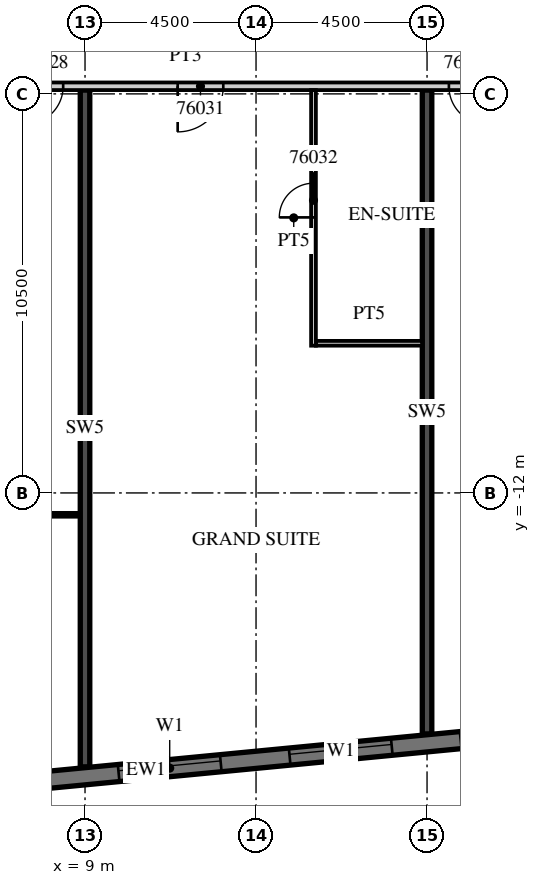
"""IFC4 building model, lengths in metres.
Left out: names, types, materials, properties, quantities, classifications, styles, units other than length and angle.
Written with IfcOpenShell. Run it as: python <this file> out.ifc"""

import sys

from ifc_helpers import new_model, si_unit, direction, frame, frame_2d, origin, place, context, subcontext, project, spatial, rectangle, extrude, element, fill, save


model = new_model("IFC4")
c1 = context("Model", 3, precision=1e-05, world=origin(), true_north=direction((0.0, 1.0)))
c2 = subcontext(c1, "Body", "Model", "MODEL_VIEW")
j1 = project(units=[si_unit("LENGTHUNIT", "METRE"), si_unit("PLANEANGLEUNIT", "RADIAN")], contexts=[c1])
p1 = place(None, origin())
s1 = spatial("IfcSite", under=j1, at=p1, CompositionType="ELEMENT")
p2 = place(p1, origin())
s2 = spatial("IfcBuilding", under=s1, at=p2, CompositionType="ELEMENT")
p3 = place(p2, frame((0.0, 0.0, 301.5)))
s3 = spatial("IfcBuildingStorey", under=s2, at=p3, CompositionType="ELEMENT", Elevation=301.5)
p4 = place(p3, frame((9.0, -19.207, 0.0), z_axis=(0.0, 0.0, 1.0), x_axis=(0.0, 1.0, 0.0)))
e1 = element("IfcWall", 1, at=p4, inside=s3, PredefinedType="SHEAR", context=c2, shape_type="SweptSolid", body=[
    extrude(rectangle(XDim=17.807, YDim=0.25, at=frame_2d((8.904, 0.0))), origin(), (0.0, 0.0, 1.0), 3.3),
])
p5 = place(p3, frame((18.0, -18.341, 0.0), z_axis=(0.0, 0.0, 1.0), x_axis=(0.0, 1.0, 0.0)))
e2 = element("IfcWall", 2, at=p5, inside=s3, PredefinedType="SHEAR", context=c2, shape_type="SweptSolid", body=[
    extrude(rectangle(XDim=16.941, YDim=0.25, at=frame_2d((8.47, 0.0))), origin(), (0.0, 0.0, 1.0), 3.3),
])
p6 = place(p3, frame((-13.521, -21.624, 0.0), z_axis=(0.0, 0.0, 1.0), x_axis=(0.995396186218, 0.095845878695, 0.0)))
e3 = element("IfcWall", 3, at=p6, inside=s3, PredefinedType="SOLIDWALL", context=c2, shape_type="SweptSolid", body=[
    extrude(rectangle(XDim=48.481, YDim=0.45, at=frame_2d((24.241, 0.0))), origin(), (0.0, 0.0, 1.0), 3.02),
])
p7 = place(p6, frame((0.91, 0.0, 0.45)))
e4 = element("IfcOpeningElement", 4, at=p7, cuts=e3, PredefinedType="OPENING", context=c2, shape_type="SweptSolid", body=[
    extrude(rectangle(XDim=2.7, YDim=2.25, at=frame_2d((1.35, 1.125))), frame((0.0, 0.235, 0.0), z_axis=(0.0, -1.0, 0.0), x_axis=(1.0, 0.0, 0.0)), (0.0, 0.0, 1.0), 0.47),
])
p8 = place(p6, frame((5.431, 0.0, 0.45)))
e5 = element("IfcOpeningElement", 5, at=p8, cuts=e3, PredefinedType="OPENING", context=c2, shape_type="SweptSolid", body=[
    extrude(rectangle(XDim=2.7, YDim=2.25, at=frame_2d((1.35, 1.125))), frame((0.0, 0.235, 0.0), z_axis=(0.0, -1.0, 0.0), x_axis=(1.0, 0.0, 0.0)), (0.0, 0.0, 1.0), 0.47),
])
p9 = place(p6, frame((9.952, 0.0, 0.45)))
e6 = element("IfcOpeningElement", 6, at=p9, cuts=e3, PredefinedType="OPENING", context=c2, shape_type="SweptSolid", body=[
    extrude(rectangle(XDim=2.7, YDim=2.25, at=frame_2d((1.35, 1.125))), frame((0.0, 0.235, 0.0), z_axis=(0.0, -1.0, 0.0), x_axis=(1.0, 0.0, 0.0)), (0.0, 0.0, 1.0), 0.47),
])
p10 = place(p6, frame((14.473, 0.0, 0.45)))
e7 = element("IfcOpeningElement", 7, at=p10, cuts=e3, PredefinedType="OPENING", context=c2, shape_type="SweptSolid", body=[
    extrude(rectangle(XDim=2.7, YDim=2.25, at=frame_2d((1.35, 1.125))), frame((0.0, 0.235, 0.0), z_axis=(0.0, -1.0, 0.0), x_axis=(1.0, 0.0, 0.0)), (0.0, 0.0, 1.0), 0.47),
])
p11 = place(p6, frame((18.994, 0.0, 0.45)))
e8 = element("IfcOpeningElement", 8, at=p11, cuts=e3, PredefinedType="OPENING", context=c2, shape_type="SweptSolid", body=[
    extrude(rectangle(XDim=2.7, YDim=2.25, at=frame_2d((1.35, 1.125))), frame((0.0, 0.235, 0.0), z_axis=(0.0, -1.0, 0.0), x_axis=(1.0, 0.0, 0.0)), (0.0, 0.0, 1.0), 0.47),
])
p12 = place(p6, frame((23.514, 0.0, 0.45)))
e9 = element("IfcOpeningElement", 9, at=p12, cuts=e3, PredefinedType="OPENING", context=c2, shape_type="SweptSolid", body=[
    extrude(rectangle(XDim=2.7, YDim=2.25, at=frame_2d((1.35, 1.125))), frame((0.0, 0.235, 0.0), z_axis=(0.0, -1.0, 0.0), x_axis=(1.0, 0.0, 0.0)), (0.0, 0.0, 1.0), 0.47),
])
p13 = place(p6, frame((28.035, 0.0, 0.45)))
e10 = element("IfcOpeningElement", 10, at=p13, cuts=e3, PredefinedType="OPENING", context=c2, shape_type="SweptSolid", body=[
    extrude(rectangle(XDim=2.7, YDim=2.25, at=frame_2d((1.35, 1.125))), frame((0.0, 0.235, 0.0), z_axis=(0.0, -1.0, 0.0), x_axis=(1.0, 0.0, 0.0)), (0.0, 0.0, 1.0), 0.47),
])
p14 = place(p6, frame((32.556, 0.0, 0.45)))
e11 = element("IfcOpeningElement", 11, at=p14, cuts=e3, PredefinedType="OPENING", context=c2, shape_type="SweptSolid", body=[
    extrude(rectangle(XDim=2.7, YDim=2.25, at=frame_2d((1.35, 1.125))), frame((0.0, 0.235, 0.0), z_axis=(0.0, -1.0, 0.0), x_axis=(1.0, 0.0, 0.0)), (0.0, 0.0, 1.0), 0.47),
])
p15 = place(p6, frame((37.077, 0.0, 0.45)))
e12 = element("IfcOpeningElement", 12, at=p15, cuts=e3, PredefinedType="OPENING", context=c2, shape_type="SweptSolid", body=[
    extrude(rectangle(XDim=2.7, YDim=2.25, at=frame_2d((1.35, 1.125))), frame((0.0, 0.235, 0.0), z_axis=(0.0, -1.0, 0.0), x_axis=(1.0, 0.0, 0.0)), (0.0, 0.0, 1.0), 0.47),
])
p16 = place(p6, frame((41.598, 0.0, 0.45)))
e13 = element("IfcOpeningElement", 13, at=p16, cuts=e3, PredefinedType="OPENING", context=c2, shape_type="SweptSolid", body=[
    extrude(rectangle(XDim=2.7, YDim=2.25, at=frame_2d((1.35, 1.125))), frame((0.0, 0.235, 0.0), z_axis=(0.0, -1.0, 0.0), x_axis=(1.0, 0.0, 0.0)), (0.0, 0.0, 1.0), 0.47),
])
p17 = place(p3, frame((-13.5, -1.3, 0.0), z_axis=(0.0, 0.0, 1.0), x_axis=(1.0, 0.0, 0.0)))
e14 = element("IfcWall", 14, at=p17, inside=s3, PredefinedType="PARTITIONING", context=c2, shape_type="SweptSolid", body=[
    extrude(rectangle(XDim=50.293, YDim=0.2, at=frame_2d((25.146, 0.0))), origin(), (0.0, 0.0, 1.0), 3.02),
])
p18 = place(p17, frame((0.575, 0.0, 0.0)))
e15 = element("IfcOpeningElement", 15, at=p18, cuts=e14, PredefinedType="OPENING", context=c2, shape_type="SweptSolid", body=[
    extrude(rectangle(XDim=1.0, YDim=2.1, at=frame_2d((0.5, 1.05))), frame((0.0, 0.11, 0.0), z_axis=(0.0, -1.0, 0.0), x_axis=(1.0, 0.0, 0.0)), (0.0, 0.0, 1.0), 0.22),
])
p19 = place(p17, frame((6.938, 0.0, 0.0)))
e16 = element("IfcOpeningElement", 16, at=p19, cuts=e14, PredefinedType="OPENING", context=c2, shape_type="SweptSolid", body=[
    extrude(rectangle(XDim=1.2, YDim=2.1, at=frame_2d((0.6, 1.05))), frame((0.0, 0.11, 0.0), z_axis=(0.0, -1.0, 0.0), x_axis=(1.0, 0.0, 0.0)), (0.0, 0.0, 1.0), 0.22),
])
p20 = place(p17, frame((16.45, 0.0, 0.0)))
e17 = element("IfcOpeningElement", 17, at=p20, cuts=e14, PredefinedType="OPENING", context=c2, shape_type="SweptSolid", body=[
    extrude(rectangle(XDim=1.0, YDim=2.1, at=frame_2d((0.5, 1.05))), frame((0.0, 0.11, 0.0), z_axis=(0.0, -1.0, 0.0), x_axis=(1.0, 0.0, 0.0)), (0.0, 0.0, 1.0), 0.22),
])
p21 = place(p17, frame((20.925, 0.0, 0.0)))
e18 = element("IfcOpeningElement", 18, at=p21, cuts=e14, PredefinedType="OPENING", context=c2, shape_type="SweptSolid", body=[
    extrude(rectangle(XDim=1.0, YDim=2.1, at=frame_2d((0.5, 1.05))), frame((0.0, 0.11, 0.0), z_axis=(0.0, -1.0, 0.0), x_axis=(1.0, 0.0, 0.0)), (0.0, 0.0, 1.0), 0.22),
])
p22 = place(p17, frame((24.938, 0.0, 0.0)))
e19 = element("IfcOpeningElement", 19, at=p22, cuts=e14, PredefinedType="OPENING", context=c2, shape_type="SweptSolid", body=[
    extrude(rectangle(XDim=1.2, YDim=2.1, at=frame_2d((0.6, 1.05))), frame((0.0, 0.11, 0.0), z_axis=(0.0, -1.0, 0.0), x_axis=(1.0, 0.0, 0.0)), (0.0, 0.0, 1.0), 0.22),
])
p23 = place(p17, frame((32.075, 0.0, 0.0)))
e20 = element("IfcOpeningElement", 20, at=p23, cuts=e14, PredefinedType="OPENING", context=c2, shape_type="SweptSolid", body=[
    extrude(rectangle(XDim=1.0, YDim=2.1, at=frame_2d((0.5, 1.05))), frame((0.0, 0.11, 0.0), z_axis=(0.0, -1.0, 0.0), x_axis=(1.0, 0.0, 0.0)), (0.0, 0.0, 1.0), 0.22),
])
p24 = place(p17, frame((38.925, 0.0, 0.0)))
e21 = element("IfcOpeningElement", 21, at=p24, cuts=e14, PredefinedType="OPENING", context=c2, shape_type="SweptSolid", body=[
    extrude(rectangle(XDim=1.0, YDim=2.1, at=frame_2d((0.5, 1.05))), frame((0.0, 0.11, 0.0), z_axis=(0.0, -1.0, 0.0), x_axis=(1.0, 0.0, 0.0)), (0.0, 0.0, 1.0), 0.22),
])
p25 = place(p17, frame((45.862, 0.0, 0.0)))
e22 = element("IfcOpeningElement", 22, at=p25, cuts=e14, PredefinedType="OPENING", context=c2, shape_type="SweptSolid", body=[
    extrude(rectangle(XDim=1.2, YDim=2.1, at=frame_2d((0.6, 1.05))), frame((0.0, 0.11, 0.0), z_axis=(0.0, -1.0, 0.0), x_axis=(1.0, 0.0, 0.0)), (0.0, 0.0, 1.0), 0.22),
])
p26 = place(p3, frame((4.6, -12.575, 0.0), z_axis=(0.0, 0.0, 1.0), x_axis=(1.0, 0.0, 0.0)))
e23 = element("IfcWall", 23, at=p26, inside=s3, PredefinedType="PARTITIONING", context=c2, shape_type="SweptSolid", body=[
    extrude(rectangle(XDim=4.275, YDim=0.1, at=frame_2d((2.137, 0.0))), origin(), (0.0, 0.0, 1.0), 3.02),
])
p27 = place(p26, frame((0.788, 0.0, 0.0)))
e24 = element("IfcOpeningElement", 24, at=p27, cuts=e23, PredefinedType="OPENING", context=c2, shape_type="SweptSolid", body=[
    extrude(rectangle(XDim=1.5, YDim=2.1, at=frame_2d((0.75, 1.05))), frame((0.0, 0.06, 0.0), z_axis=(0.0, -1.0, 0.0), x_axis=(1.0, 0.0, 0.0)), (0.0, 0.0, 1.0), 0.12),
])
p28 = place(p3, frame((15.012, -8.125, 0.0), z_axis=(0.0, 0.0, 1.0), x_axis=(0.0, 1.0, 0.0)))
e25 = element("IfcWall", 25, at=p28, inside=s3, PredefinedType="PARTITIONING", context=c2, shape_type="SweptSolid", body=[
    extrude(rectangle(XDim=6.725, YDim=0.125, at=frame_2d((3.363, 0.0))), origin(), (0.0, 0.0, 1.0), 3.02),
])
p29 = place(p28, frame((3.375, 0.0, 0.0)))
e26 = element("IfcOpeningElement", 26, at=p29, cuts=e25, PredefinedType="OPENING", context=c2, shape_type="SweptSolid", body=[
    extrude(rectangle(XDim=0.9, YDim=2.1, at=frame_2d((0.45, 1.05))), frame((0.0, 0.073, 0.0), z_axis=(0.0, -1.0, 0.0), x_axis=(1.0, 0.0, 0.0)), (0.0, 0.0, 1.0), 0.145),
])
p30 = place(p3, frame((15.075, -8.062, 0.0), z_axis=(0.0, 0.0, 1.0), x_axis=(1.0, 0.0, 0.0)))
e27 = element("IfcWall", 27, at=p30, inside=s3, PredefinedType="PARTITIONING", context=c2, shape_type="SweptSolid", body=[
    extrude(rectangle(XDim=2.8, YDim=0.125, at=frame_2d((1.4, 0.0))), origin(), (0.0, 0.0, 1.0), 3.02),
])
p31 = place(p12, origin())
e28 = element("IfcWindow", 28, at=p31, inside=s3, PartitioningType="SINGLE_PANEL", PredefinedType="WINDOW", context=c2, shape_type="SweptSolid", body=[
    extrude(rectangle(XDim=2.7, YDim=2.25, at=frame_2d((1.35, 1.125))), frame((0.0, 0.09, 0.0), z_axis=(0.0, -1.0, 0.0), x_axis=(1.0, 0.0, 0.0)), (0.0, 0.0, 1.0), 0.06),
])
fill(e9, e28)
p32 = place(p13, origin())
e29 = element("IfcWindow", 29, at=p32, inside=s3, PartitioningType="SINGLE_PANEL", PredefinedType="WINDOW", context=c2, shape_type="SweptSolid", body=[
    extrude(rectangle(XDim=2.7, YDim=2.25, at=frame_2d((1.35, 1.125))), frame((0.0, 0.09, 0.0), z_axis=(0.0, -1.0, 0.0), x_axis=(1.0, 0.0, 0.0)), (0.0, 0.0, 1.0), 0.06),
])
fill(e10, e29)
p33 = place(p21, origin())
e30 = element("IfcDoor", 30, at=p33, inside=s3, OperationType="SINGLE_SWING_LEFT", PredefinedType="DOOR", context=c2, shape_type="SweptSolid", body=[
    extrude(rectangle(XDim=1.0, YDim=2.1, at=frame_2d((0.5, 1.05))), frame((0.0, 0.025, 0.0), z_axis=(0.0, -1.0, 0.0), x_axis=(1.0, 0.0, 0.0)), (0.0, 0.0, 1.0), 0.05),
])
fill(e18, e30)
p34 = place(p22, origin())
e31 = element("IfcDoor", 31, at=p34, inside=s3, OperationType="SINGLE_SWING_LEFT", PredefinedType="DOOR", context=c2, shape_type="SweptSolid", body=[
    extrude(rectangle(XDim=1.2, YDim=2.1, at=frame_2d((0.6, 1.05))), frame((0.0, 0.025, 0.0), z_axis=(0.0, -1.0, 0.0), x_axis=(1.0, 0.0, 0.0)), (0.0, 0.0, 1.0), 0.05),
])
fill(e19, e31)
p35 = place(p29, origin())
e32 = element("IfcDoor", 32, at=p35, inside=s3, OperationType="SINGLE_SWING_LEFT", PredefinedType="DOOR", context=c2, shape_type="SweptSolid", body=[
    extrude(rectangle(XDim=0.9, YDim=2.1, at=frame_2d((0.45, 1.05))), frame((0.0, 0.025, 0.0), z_axis=(0.0, -1.0, 0.0), x_axis=(1.0, 0.0, 0.0)), (0.0, 0.0, 1.0), 0.05),
])
fill(e26, e32)
p36 = place(p23, origin())
e33 = element("IfcDoor", 33, at=p36, inside=s3, OperationType="SINGLE_SWING_RIGHT", PredefinedType="DOOR", context=c2, shape_type="SweptSolid", body=[
    extrude(rectangle(XDim=1.0, YDim=2.1, at=frame_2d((0.5, 1.05))), frame((0.0, 0.025, 0.0), z_axis=(0.0, -1.0, 0.0), x_axis=(1.0, 0.0, 0.0)), (0.0, 0.0, 1.0), 0.05),
])
fill(e20, e33)
save(model, sys.argv[1])
